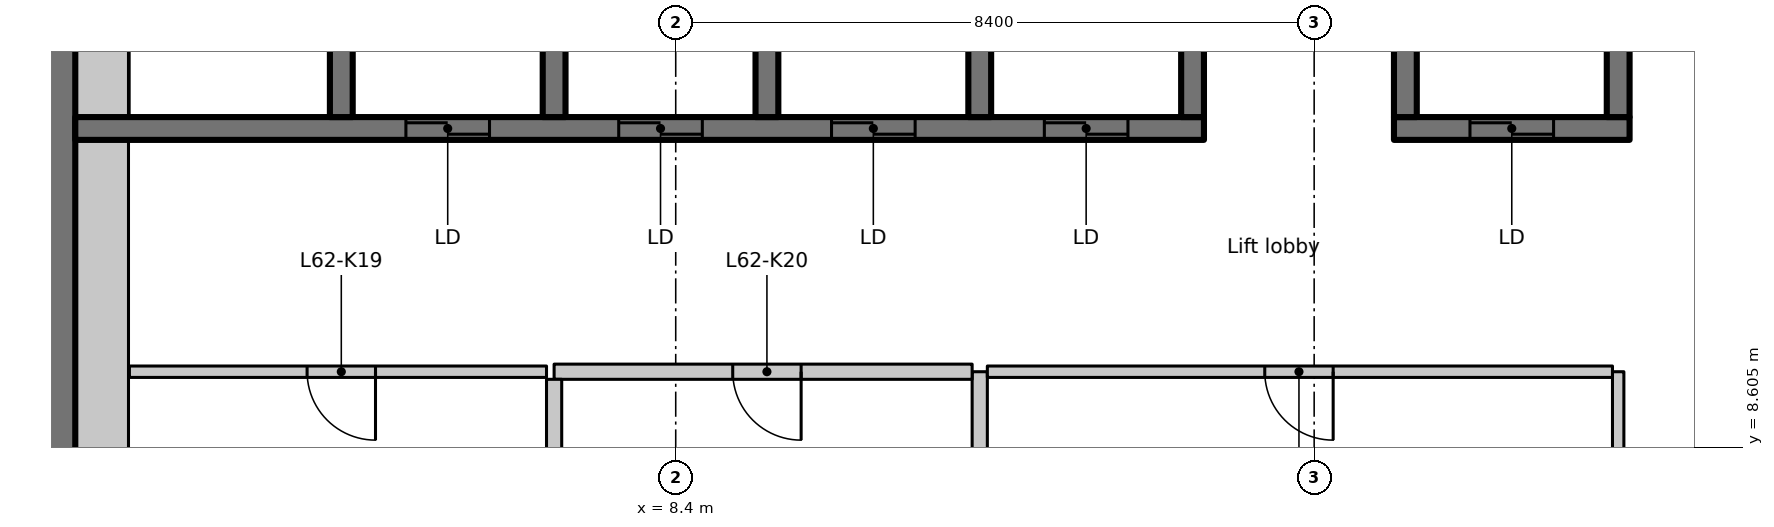
"""IFC4 building model, lengths in metres.
Left out: names, types, materials, properties, quantities, classifications, styles, units other than length and angle.
Written with IfcOpenShell. Run it as: python <this file> out.ifc"""

import sys

from ifc_helpers import new_model, si_unit, direction, frame, frame_2d, origin, place, context, subcontext, project, spatial, rectangle, extrude, element, fill, save


model = new_model("IFC4")
c1 = context("Model", 3, precision=1e-05, world=origin(), true_north=direction((0.0, 1.0)))
c2 = subcontext(c1, "Body", "Model", "MODEL_VIEW")
j1 = project(units=[si_unit("LENGTHUNIT", "METRE"), si_unit("PLANEANGLEUNIT", "RADIAN")], contexts=[c1])
p1 = place(None, origin())
s1 = spatial("IfcSite", under=j1, at=p1, CompositionType="ELEMENT")
p2 = place(p1, origin())
s2 = spatial("IfcBuilding", under=s1, at=p2, CompositionType="ELEMENT")
p3 = place(p2, frame((0.0, 0.0, 244.5)))
s3 = spatial("IfcBuildingStorey", under=s2, at=p3, CompositionType="ELEMENT", Elevation=244.5)
p4 = place(p3, frame((0.25, 7.436, 0.0), z_axis=(0.0, 0.0, 1.0), x_axis=(0.0, 1.0, 0.0)))
e1 = element("IfcWall", 1, at=p4, inside=s3, PredefinedType="SHEAR", context=c2, shape_type="SweptSolid", body=[
    extrude(rectangle(XDim=8.864, YDim=0.5, at=frame_2d((4.432, 0.0))), origin(), (0.0, 0.0, 1.0), 3.35),
])
p5 = place(p3, frame((0.5, 12.8, 0.0), z_axis=(0.0, 0.0, 1.0), x_axis=(1.0, 0.0, 0.0)))
e2 = element("IfcWall", 2, at=p5, inside=s3, PredefinedType="SHEAR", context=c2, shape_type="SweptSolid", body=[
    extrude(rectangle(XDim=14.85, YDim=0.3, at=frame_2d((7.425, 0.0))), origin(), (0.0, 0.0, 1.0), 3.35),
])
p6 = place(p5, frame((4.35, 0.0, 0.0)))
e3 = element("IfcOpeningElement", 3, at=p6, cuts=e2, PredefinedType="OPENING", context=c2, shape_type="SweptSolid", body=[
    extrude(rectangle(XDim=1.1, YDim=2.3, at=frame_2d((0.55, 1.15))), frame((0.0, 0.16, 0.0), z_axis=(0.0, -1.0, 0.0), x_axis=(1.0, 0.0, 0.0)), (0.0, 0.0, 1.0), 0.32),
])
p7 = place(p5, frame((7.15, 0.0, 0.0)))
e4 = element("IfcOpeningElement", 4, at=p7, cuts=e2, PredefinedType="OPENING", context=c2, shape_type="SweptSolid", body=[
    extrude(rectangle(XDim=1.1, YDim=2.3, at=frame_2d((0.55, 1.15))), frame((0.0, 0.16, 0.0), z_axis=(0.0, -1.0, 0.0), x_axis=(1.0, 0.0, 0.0)), (0.0, 0.0, 1.0), 0.32),
])
p8 = place(p5, frame((9.95, 0.0, 0.0)))
e5 = element("IfcOpeningElement", 5, at=p8, cuts=e2, PredefinedType="OPENING", context=c2, shape_type="SweptSolid", body=[
    extrude(rectangle(XDim=1.1, YDim=2.3, at=frame_2d((0.55, 1.15))), frame((0.0, 0.16, 0.0), z_axis=(0.0, -1.0, 0.0), x_axis=(1.0, 0.0, 0.0)), (0.0, 0.0, 1.0), 0.32),
])
p9 = place(p5, frame((12.75, 0.0, 0.0)))
e6 = element("IfcOpeningElement", 6, at=p9, cuts=e2, PredefinedType="OPENING", context=c2, shape_type="SweptSolid", body=[
    extrude(rectangle(XDim=1.1, YDim=2.3, at=frame_2d((0.55, 1.15))), frame((0.0, 0.16, 0.0), z_axis=(0.0, -1.0, 0.0), x_axis=(1.0, 0.0, 0.0)), (0.0, 0.0, 1.0), 0.32),
])
for number, where, z_axis, x_axis in (
    (7, (4.0, 12.95, 0.0), (0.0, 0.0, 1.0), (0.0, 1.0, 0.0)),
    (8, (6.8, 12.95, 0.0), (0.0, 0.0, 1.0), (0.0, 1.0, 0.0)),
    (9, (9.6, 12.95, 0.0), (0.0, 0.0, 1.0), (0.0, 1.0, 0.0)),
    (10, (12.4, 12.95, 0.0), (0.0, 0.0, 1.0), (0.0, 1.0, 0.0)),
    (11, (15.2, 12.95, 0.0), (0.0, 0.0, 1.0), (0.0, 1.0, 0.0)),
):
    element("IfcWall", number, at=place(p3, frame(where, z_axis=z_axis, x_axis=x_axis)), inside=s3, PredefinedType="SHEAR", context=c2, shape_type="SweptSolid", body=[
        extrude(rectangle(XDim=3.35, YDim=0.3, at=frame_2d((1.675, 0.0))), origin(), (0.0, 0.0, 1.0), 3.35),
    ])
p10 = place(p3, frame((17.85, 12.8, 0.0), z_axis=(0.0, 0.0, 1.0), x_axis=(1.0, 0.0, 0.0)))
e12 = element("IfcWall", 12, at=p10, inside=s3, PredefinedType="SHEAR", context=c2, shape_type="SweptSolid", body=[
    extrude(rectangle(XDim=3.1, YDim=0.3, at=frame_2d((1.55, 0.0))), origin(), (0.0, 0.0, 1.0), 3.35),
])
p11 = place(p10, frame((1.0, 0.0, 0.0)))
e13 = element("IfcOpeningElement", 13, at=p11, cuts=e12, PredefinedType="OPENING", context=c2, shape_type="SweptSolid", body=[
    extrude(rectangle(XDim=1.1, YDim=2.3, at=frame_2d((0.55, 1.15))), frame((0.0, 0.16, 0.0), z_axis=(0.0, -1.0, 0.0), x_axis=(1.0, 0.0, 0.0)), (0.0, 0.0, 1.0), 0.32),
])
for number, where, z_axis, x_axis in (
    (14, (18.0, 12.95, 0.0), (0.0, 0.0, 1.0), (0.0, 1.0, 0.0)),
    (15, (20.8, 12.95, 0.0), (0.0, 0.0, 1.0), (0.0, 1.0, 0.0)),
):
    element("IfcWall", number, at=place(p3, frame(where, z_axis=z_axis, x_axis=x_axis)), inside=s3, PredefinedType="SHEAR", context=c2, shape_type="SweptSolid", body=[
        extrude(rectangle(XDim=3.35, YDim=0.3, at=frame_2d((1.675, 0.0))), origin(), (0.0, 0.0, 1.0), 3.35),
    ])
p12 = place(p3, frame((12.4, 7.1, 0.0), z_axis=(0.0, 0.0, 1.0), x_axis=(0.0, 1.0, 0.0)))
e16 = element("IfcWall", 16, at=p12, inside=s3, PredefinedType="PARTITIONING", context=c2, shape_type="SweptSolid", body=[
    extrude(rectangle(XDim=2.5, YDim=0.2, at=frame_2d((1.25, 0.0))), origin(), (0.0, 0.0, 1.0), 3.35),
])
p13 = place(p3, frame((12.3, 9.6, 0.0), z_axis=(0.0, 0.0, 1.0), x_axis=(-1.0, 0.0, 0.0)))
e17 = element("IfcWall", 17, at=p13, inside=s3, PredefinedType="PARTITIONING", context=c2, shape_type="SweptSolid", body=[
    extrude(rectangle(XDim=5.5, YDim=0.2, at=frame_2d((2.75, 0.0))), origin(), (0.0, 0.0, 1.0), 3.35),
])
p14 = place(p13, frame((2.25, 0.0, 0.0)))
e18 = element("IfcOpeningElement", 18, at=p14, cuts=e17, PredefinedType="OPENING", context=c2, shape_type="SweptSolid", body=[
    extrude(rectangle(XDim=0.9, YDim=2.1, at=frame_2d((0.45, 1.05))), frame((0.0, 0.11, 0.0), z_axis=(0.0, -1.0, 0.0), x_axis=(1.0, 0.0, 0.0)), (0.0, 0.0, 1.0), 0.22),
])
p15 = place(p3, frame((6.8, 9.5, 0.0), z_axis=(0.0, 0.0, 1.0), x_axis=(0.0, -1.0, 0.0)))
e19 = element("IfcWall", 19, at=p15, inside=s3, PredefinedType="PARTITIONING", context=c2, shape_type="SweptSolid", body=[
    extrude(rectangle(XDim=2.4, YDim=0.2, at=frame_2d((1.2, 0.0))), origin(), (0.0, 0.0, 1.0), 3.35),
])
p16 = place(p3, frame((6.7, 9.6, 0.0), z_axis=(0.0, 0.0, 1.0), x_axis=(-1.0, 0.0, 0.0)))
e20 = element("IfcWall", 20, at=p16, inside=s3, PredefinedType="PARTITIONING", context=c2, shape_type="SweptSolid", body=[
    extrude(rectangle(XDim=5.488, YDim=0.15, at=frame_2d((2.744, 0.0))), origin(), (0.0, 0.0, 1.0), 3.35),
])
p17 = place(p16, frame((2.25, 0.0, 0.0)))
e21 = element("IfcOpeningElement", 21, at=p17, cuts=e20, PredefinedType="OPENING", context=c2, shape_type="SweptSolid", body=[
    extrude(rectangle(XDim=0.9, YDim=2.1, at=frame_2d((0.45, 1.05))), frame((0.0, 0.085, 0.0), z_axis=(0.0, -1.0, 0.0), x_axis=(1.0, 0.0, 0.0)), (0.0, 0.0, 1.0), 0.17),
])
p18 = place(p3, frame((20.8, 7.075, 0.0), z_axis=(0.0, 0.0, 1.0), x_axis=(0.0, 1.0, 0.0)))
e22 = element("IfcWall", 22, at=p18, inside=s3, PredefinedType="PARTITIONING", context=c2, shape_type="SweptSolid", body=[
    extrude(rectangle(XDim=2.525, YDim=0.15, at=frame_2d((1.263, 0.0))), origin(), (0.0, 0.0, 1.0), 3.35),
])
p19 = place(p3, frame((20.725, 9.6, 0.0), z_axis=(0.0, 0.0, 1.0), x_axis=(-1.0, 0.0, 0.0)))
e23 = element("IfcWall", 23, at=p19, inside=s3, PredefinedType="PARTITIONING", context=c2, shape_type="SweptSolid", body=[
    extrude(rectangle(XDim=8.225, YDim=0.15, at=frame_2d((4.113, 0.0))), origin(), (0.0, 0.0, 1.0), 3.35),
])
p20 = place(p19, frame((3.675, 0.0, 0.0)))
e24 = element("IfcOpeningElement", 24, at=p20, cuts=e23, PredefinedType="OPENING", context=c2, shape_type="SweptSolid", body=[
    extrude(rectangle(XDim=0.9, YDim=2.1, at=frame_2d((0.45, 1.05))), frame((0.0, 0.085, 0.0), z_axis=(0.0, -1.0, 0.0), x_axis=(1.0, 0.0, 0.0)), (0.0, 0.0, 1.0), 0.17),
])
p21 = place(p3, frame((0.85, 7.436, 0.0), z_axis=(0.0, 0.0, 1.0), x_axis=(0.0, 1.0, 0.0)))
e25 = element("IfcWall", 25, at=p21, inside=s3, PredefinedType="PARTITIONING", context=c2, shape_type="SweptSolid", body=[
    extrude(rectangle(XDim=5.214, YDim=0.7, at=frame_2d((2.607, 0.0))), origin(), (0.0, 0.0, 1.0), 3.35),
])
p22 = place(p3, frame((0.85, 12.95, 0.0), z_axis=(0.0, 0.0, 1.0), x_axis=(0.0, 1.0, 0.0)))
e26 = element("IfcWall", 26, at=p22, inside=s3, PredefinedType="PARTITIONING", context=c2, shape_type="SweptSolid", body=[
    extrude(rectangle(XDim=2.65, YDim=0.7, at=frame_2d((1.325, 0.0))), origin(), (0.0, 0.0, 1.0), 3.35),
])
p23 = place(p6, origin())
e27 = element("IfcDoor", 27, at=p23, inside=s3, OperationType="SLIDING_TO_LEFT", PredefinedType="DOOR", context=c2, shape_type="SweptSolid", body=[
    extrude(rectangle(XDim=1.1, YDim=2.3, at=frame_2d((0.55, 1.15))), frame((0.0, 0.025, 0.0), z_axis=(0.0, -1.0, 0.0), x_axis=(1.0, 0.0, 0.0)), (0.0, 0.0, 1.0), 0.05),
])
fill(e3, e27)
p24 = place(p7, origin())
e28 = element("IfcDoor", 28, at=p24, inside=s3, OperationType="SLIDING_TO_LEFT", PredefinedType="DOOR", context=c2, shape_type="SweptSolid", body=[
    extrude(rectangle(XDim=1.1, YDim=2.3, at=frame_2d((0.55, 1.15))), frame((0.0, 0.025, 0.0), z_axis=(0.0, -1.0, 0.0), x_axis=(1.0, 0.0, 0.0)), (0.0, 0.0, 1.0), 0.05),
])
fill(e4, e28)
p25 = place(p8, origin())
e29 = element("IfcDoor", 29, at=p25, inside=s3, OperationType="SLIDING_TO_LEFT", PredefinedType="DOOR", context=c2, shape_type="SweptSolid", body=[
    extrude(rectangle(XDim=1.1, YDim=2.3, at=frame_2d((0.55, 1.15))), frame((0.0, 0.025, 0.0), z_axis=(0.0, -1.0, 0.0), x_axis=(1.0, 0.0, 0.0)), (0.0, 0.0, 1.0), 0.05),
])
fill(e5, e29)
p26 = place(p9, origin())
e30 = element("IfcDoor", 30, at=p26, inside=s3, OperationType="SLIDING_TO_LEFT", PredefinedType="DOOR", context=c2, shape_type="SweptSolid", body=[
    extrude(rectangle(XDim=1.1, YDim=2.3, at=frame_2d((0.55, 1.15))), frame((0.0, 0.025, 0.0), z_axis=(0.0, -1.0, 0.0), x_axis=(1.0, 0.0, 0.0)), (0.0, 0.0, 1.0), 0.05),
])
fill(e6, e30)
p27 = place(p11, origin())
e31 = element("IfcDoor", 31, at=p27, inside=s3, OperationType="SLIDING_TO_LEFT", PredefinedType="DOOR", context=c2, shape_type="SweptSolid", body=[
    extrude(rectangle(XDim=1.1, YDim=2.3, at=frame_2d((0.55, 1.15))), frame((0.0, 0.025, 0.0), z_axis=(0.0, -1.0, 0.0), x_axis=(1.0, 0.0, 0.0)), (0.0, 0.0, 1.0), 0.05),
])
fill(e13, e31)
p28 = place(p17, origin())
e32 = element("IfcDoor", 32, at=p28, inside=s3, OperationType="SINGLE_SWING_LEFT", PredefinedType="DOOR", context=c2, shape_type="SweptSolid", body=[
    extrude(rectangle(XDim=0.9, YDim=2.1, at=frame_2d((0.45, 1.05))), frame((0.0, 0.025, 0.0), z_axis=(0.0, -1.0, 0.0), x_axis=(1.0, 0.0, 0.0)), (0.0, 0.0, 1.0), 0.05),
])
fill(e21, e32)
p29 = place(p14, origin())
e33 = element("IfcDoor", 33, at=p29, inside=s3, OperationType="SINGLE_SWING_RIGHT", PredefinedType="DOOR", context=c2, shape_type="SweptSolid", body=[
    extrude(rectangle(XDim=0.9, YDim=2.1, at=frame_2d((0.45, 1.05))), frame((0.0, 0.025, 0.0), z_axis=(0.0, -1.0, 0.0), x_axis=(1.0, 0.0, 0.0)), (0.0, 0.0, 1.0), 0.05),
])
fill(e18, e33)
p30 = place(p20, origin())
e34 = element("IfcDoor", 34, at=p30, inside=s3, OperationType="SINGLE_SWING_LEFT", PredefinedType="DOOR", context=c2, shape_type="SweptSolid", body=[
    extrude(rectangle(XDim=0.9, YDim=2.1, at=frame_2d((0.45, 1.05))), frame((0.0, 0.025, 0.0), z_axis=(0.0, -1.0, 0.0), x_axis=(1.0, 0.0, 0.0)), (0.0, 0.0, 1.0), 0.05),
])
fill(e24, e34)
save(model, sys.argv[1])
